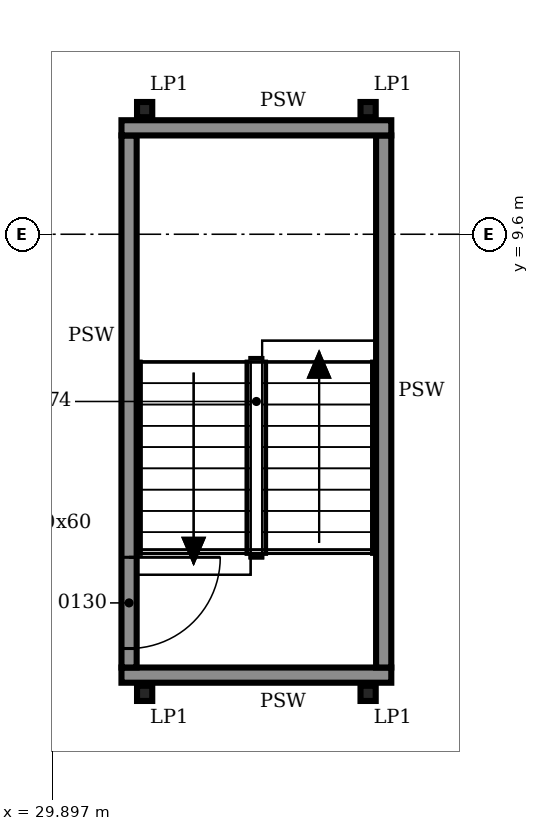
"""IFC4 building model, lengths in metres.
Left out: names, types, materials, properties, quantities, classifications, styles, units other than length and angle.
Written with IfcOpenShell. Run it as: python <this file> out.ifc"""

import sys

from ifc_helpers import new_model, si_unit, direction, frame, frame_2d, origin, origin_2d, place, context, subcontext, project, spatial, rectangle, i_section, extrude, element, fill, save


model = new_model("IFC4")
c1 = context("Model", 3, precision=1e-05, world=origin(), true_north=direction((0.0, 1.0)))
c2 = subcontext(c1, "Body", "Model", "MODEL_VIEW")
j1 = project(units=[si_unit("LENGTHUNIT", "METRE"), si_unit("PLANEANGLEUNIT", "RADIAN")], contexts=[c1])
p1 = place(None, origin())
s1 = spatial("IfcSite", under=j1, at=p1, CompositionType="ELEMENT")
p2 = place(p1, origin())
s2 = spatial("IfcBuilding", under=s1, at=p2, CompositionType="ELEMENT")
p3 = place(p2, frame((0.0, 0.0, 9.0)))
s3 = spatial("IfcBuildingStorey", under=s2, at=p3, CompositionType="ELEMENT", Elevation=9.0)
for number, where, z_axis, x_axis in (
    (1, (31.105, 11.24, 0.0), (0.0, 0.0, 1.0), (1.0, 0.0, 0.0)),
    (2, (34.045, 11.24, 0.0), (0.0, 0.0, 1.0), (1.0, 0.0, 0.0)),
    (3, (31.105, 3.56, 0.0), (0.0, 0.0, 1.0), (1.0, 0.0, 0.0)),
    (4, (34.045, 3.56, 0.0), (0.0, 0.0, 1.0), (1.0, 0.0, 0.0)),
):
    element("IfcColumn", number, at=place(p3, frame(where, z_axis=z_axis, x_axis=x_axis)), inside=s3, PredefinedType="COLUMN", context=c2, shape_type="SweptSolid", body=[
        extrude(i_section(OverallWidth=0.2, OverallDepth=0.2, WebThickness=0.009, FlangeThickness=0.015, FilletRadius=0.018, at=origin_2d()), origin(), (0.0, 0.0, 1.0), 6.0),
    ])
p4 = place(p3, frame((30.8, 3.8, 0.0), z_axis=(0.0, 0.0, 1.0), x_axis=(1.0, 0.0, 0.0)))
e5 = element("IfcWall", 5, at=p4, inside=s3, PredefinedType="SOLIDWALL", context=c2, shape_type="SweptSolid", body=[
    extrude(rectangle(XDim=3.55, YDim=0.2, at=frame_2d((1.775, 0.0))), origin(), (0.0, 0.0, 1.0), 5.8),
])
p5 = place(p3, frame((30.9, 3.9, 0.0), z_axis=(0.0, 0.0, 1.0), x_axis=(0.0, 1.0, 0.0)))
e6 = element("IfcWall", 6, at=p5, inside=s3, PredefinedType="SOLIDWALL", context=c2, shape_type="SweptSolid", body=[
    extrude(rectangle(XDim=7.0, YDim=0.2, at=frame_2d((3.5, 0.0))), origin(), (0.0, 0.0, 1.0), 5.8),
])
p6 = place(p5, frame((0.25, 0.0, 0.0)))
e7 = element("IfcOpeningElement", 7, at=p6, cuts=e6, PredefinedType="OPENING", context=c2, shape_type="SweptSolid", body=[
    extrude(rectangle(XDim=1.2, YDim=2.1, at=frame_2d((0.6, 1.05))), frame((0.0, 0.11, 0.0), z_axis=(0.0, -1.0, 0.0), x_axis=(1.0, 0.0, 0.0)), (0.0, 0.0, 1.0), 0.22),
])
p7 = place(p3, frame((34.25, 3.9, 0.0), z_axis=(0.0, 0.0, 1.0), x_axis=(0.0, 1.0, 0.0)))
e8 = element("IfcWall", 8, at=p7, inside=s3, PredefinedType="SOLIDWALL", context=c2, shape_type="SweptSolid", body=[
    extrude(rectangle(XDim=7.0, YDim=0.2, at=frame_2d((3.5, 0.0))), origin(), (0.0, 0.0, 1.0), 5.8),
])
p8 = place(p3, frame((30.8, 11.0, 0.0), z_axis=(0.0, 0.0, 1.0), x_axis=(1.0, 0.0, 0.0)))
e9 = element("IfcWall", 9, at=p8, inside=s3, PredefinedType="SOLIDWALL", context=c2, shape_type="SweptSolid", body=[
    extrude(rectangle(XDim=3.55, YDim=0.2, at=frame_2d((1.775, 0.0))), origin(), (0.0, 0.0, 1.0), 5.8),
])
p9 = place(p6, frame((1.2, 0.0, 0.0), z_axis=(0.0, 0.0, 1.0), x_axis=(-1.0, 0.0, 0.0)))
e10 = element("IfcDoor", 10, at=p9, inside=s3, OperationType="SINGLE_SWING_LEFT", PredefinedType="DOOR", context=c2, shape_type="SweptSolid", body=[
    extrude(rectangle(XDim=1.2, YDim=2.1, at=frame_2d((0.6, 1.05))), frame((0.0, 0.025, 0.0), z_axis=(0.0, -1.0, 0.0), x_axis=(1.0, 0.0, 0.0)), (0.0, 0.0, 1.0), 0.05),
])
fill(e7, e10)
save(model, sys.argv[1])
